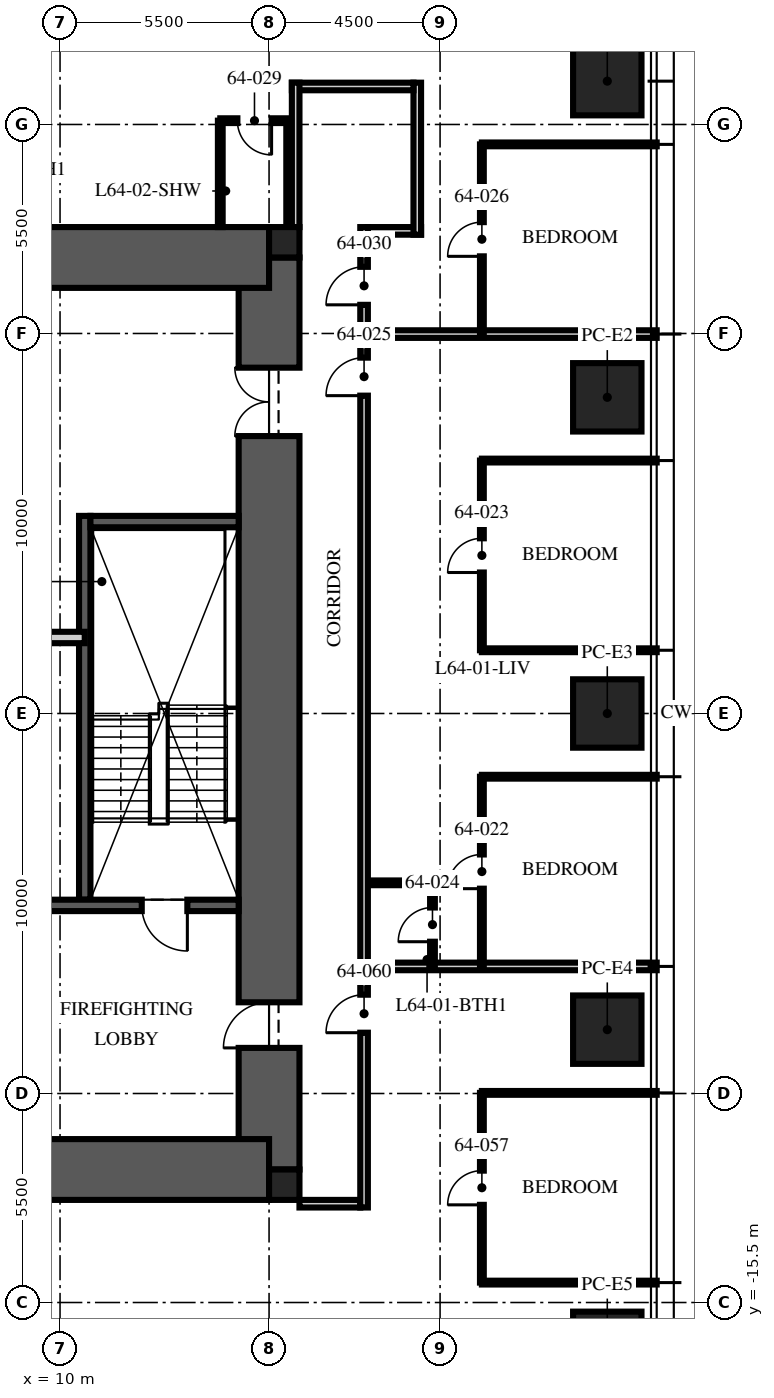
"""IFC4 building model, lengths in metres.
Left out: names, types, materials, properties, quantities, classifications, styles, units other than length and angle.
Written with IfcOpenShell. Run it as: python <this file> out.ifc"""

import sys

from ifc_helpers import new_model, si_unit, direction, frame, frame_2d, origin, origin_2d, place, context, subcontext, project, spatial, rectangle, extrude, element, fill, save


model = new_model("IFC4")
c1 = context("Model", 3, precision=1e-05, world=origin(), true_north=direction((0.0, 1.0)))
c2 = subcontext(c1, "Body", "Model", "MODEL_VIEW")
j1 = project(units=[si_unit("LENGTHUNIT", "METRE"), si_unit("PLANEANGLEUNIT", "RADIAN")], contexts=[c1])
p1 = place(None, origin())
s1 = spatial("IfcSite", under=j1, at=p1, CompositionType="ELEMENT")
p2 = place(p1, origin())
s2 = spatial("IfcBuilding", under=s1, at=p2, CompositionType="ELEMENT")
p3 = place(p2, frame((0.0, 0.0, 255.75)))
s3 = spatial("IfcBuildingStorey", under=s2, at=p3, CompositionType="ELEMENT", Elevation=255.75)
p4 = place(p3, frame((15.5, -12.0, -0.25), z_axis=(0.0, 0.0, 1.0), x_axis=(0.0, 1.0, 0.0)))
e1 = element("IfcWall", 1, at=p4, inside=s3, PredefinedType="SHEAR", context=c2, shape_type="SweptSolid", body=[
    extrude(rectangle(XDim=24.0, YDim=1.6, at=frame_2d((12.0, 0.0))), origin(), (0.0, 0.0, 1.0), 3.75),
])
p5 = place(p4, frame((3.2, 0.0, 0.25)))
e2 = element("IfcOpeningElement", 2, at=p5, cuts=e1, PredefinedType="OPENING", context=c2, shape_type="SweptSolid", body=[
    extrude(rectangle(XDim=1.2, YDim=2.1, at=frame_2d((0.6, 1.05))), frame((0.0, 0.81, 0.0), z_axis=(0.0, -1.0, 0.0), x_axis=(1.0, 0.0, 0.0)), (0.0, 0.0, 1.0), 1.62),
])
p6 = place(p4, frame((19.3, 0.0, 0.25)))
e3 = element("IfcOpeningElement", 3, at=p6, cuts=e1, PredefinedType="OPENING", context=c2, shape_type="SweptSolid", body=[
    extrude(rectangle(XDim=1.8, YDim=2.1, at=frame_2d((0.9, 1.05))), frame((0.0, 0.81, 0.0), z_axis=(0.0, -1.0, 0.0), x_axis=(1.0, 0.0, 0.0)), (0.0, 0.0, 1.0), 1.62),
])
for number, where, z_axis, x_axis in (
    (4, (-15.5, 12.0, -0.25), (0.0, 0.0, 1.0), (1.0, 0.0, 0.0)),
    (5, (-15.5, -12.0, -0.25), (0.0, 0.0, 1.0), (1.0, 0.0, 0.0)),
):
    element("IfcWall", number, at=place(p3, frame(where, z_axis=z_axis, x_axis=x_axis)), inside=s3, PredefinedType="SHEAR", context=c2, shape_type="SweptSolid", body=[
        extrude(rectangle(XDim=31.0, YDim=1.6, at=frame_2d((15.5, 0.0))), origin(), (0.0, 0.0, 1.0), 3.75),
    ])
for number, where, z_axis, x_axis in (
    (6, (15.9, 12.4, -0.25), (0.0, 0.0, 1.0), (1.0, 0.0, 0.0)),
    (7, (15.9, -12.4, -0.25), (0.0, 0.0, 1.0), (1.0, 0.0, 0.0)),
):
    element("IfcColumn", number, at=place(p3, frame(where, z_axis=z_axis, x_axis=x_axis)), inside=s3, PredefinedType="COLUMN", context=c2, shape_type="SweptSolid", body=[
        extrude(rectangle(XDim=0.8, YDim=0.8, at=origin_2d()), origin(), (0.0, 0.0, 1.0), 3.75),
    ])
for number, where, z_axis, x_axis in (
    (8, (24.4, 16.64, 0.0), (0.0, 0.0, 1.0), (0.0, 1.0, 0.0)),
    (9, (24.4, 8.32, 0.0), (0.0, 0.0, 1.0), (0.0, 1.0, 0.0)),
    (10, (24.4, 0.0, 0.0), (0.0, 0.0, 1.0), (0.0, 1.0, 0.0)),
    (11, (24.4, -8.32, 0.0), (0.0, 0.0, 1.0), (0.0, 1.0, 0.0)),
    (12, (24.4, -16.64, 0.0), (0.0, 0.0, 1.0), (0.0, 1.0, 0.0)),
):
    element("IfcColumn", number, at=place(p3, frame(where, z_axis=z_axis, x_axis=x_axis)), inside=s3, PredefinedType="COLUMN", context=c2, shape_type="SweptSolid", body=[
        extrude(rectangle(XDim=1.8, YDim=1.8, at=origin_2d()), origin(), (0.0, 0.0, 1.0), 3.75),
    ])
p7 = place(p3, frame((10.65, -4.9, 0.0), z_axis=(0.0, 0.0, 1.0), x_axis=(0.0, 1.0, 0.0)))
e13 = element("IfcWall", 13, at=p7, inside=s3, PredefinedType="SOLIDWALL", context=c2, shape_type="SweptSolid", body=[
    extrude(rectangle(XDim=10.1, YDim=0.3, at=frame_2d((5.05, 0.0))), origin(), (0.0, 0.0, 1.0), 3.5),
])
p8 = place(p3, frame((14.7, -5.05, 0.0), z_axis=(0.0, 0.0, 1.0), x_axis=(-1.0, 0.0, 0.0)))
e14 = element("IfcWall", 14, at=p8, inside=s3, PredefinedType="SOLIDWALL", context=c2, shape_type="SweptSolid", body=[
    extrude(rectangle(XDim=5.9, YDim=0.3, at=frame_2d((2.95, 0.0))), origin(), (0.0, 0.0, 1.0), 3.5),
])
p9 = place(p8, frame((1.35, 0.0, 0.0)))
e15 = element("IfcOpeningElement", 15, at=p9, cuts=e14, PredefinedType="OPENING", context=c2, shape_type="SweptSolid", body=[
    extrude(rectangle(XDim=1.2, YDim=2.1, at=frame_2d((0.6, 1.05))), frame((0.0, 0.16, 0.0), z_axis=(0.0, -1.0, 0.0), x_axis=(1.0, 0.0, 0.0)), (0.0, 0.0, 1.0), 0.32),
])
p10 = place(p3, frame((14.7, 5.05, 0.0), z_axis=(0.0, 0.0, 1.0), x_axis=(-1.0, 0.0, 0.0)))
e16 = element("IfcWall", 16, at=p10, inside=s3, PredefinedType="SOLIDWALL", context=c2, shape_type="SweptSolid", body=[
    extrude(rectangle(XDim=3.9, YDim=0.3, at=frame_2d((1.95, 0.0))), origin(), (0.0, 0.0, 1.0), 3.5),
])
p11 = place(p3, frame((-10.65, 2.0, 0.0), z_axis=(0.0, 0.0, 1.0), x_axis=(1.0, 0.0, 0.0)))
e17 = element("IfcWall", 17, at=p11, inside=s3, PredefinedType="PARTITIONING", context=c2, shape_type="SweptSolid", body=[
    extrude(rectangle(XDim=21.3, YDim=0.3, at=frame_2d((10.65, 0.0))), origin(), (0.0, 0.0, 1.0), 3.5),
])
p12 = place(p11, frame((10.05, 0.0, 0.0)))
e18 = element("IfcOpeningElement", 18, at=p12, cuts=e17, PredefinedType="OPENING", context=c2, shape_type="SweptSolid", body=[
    extrude(rectangle(XDim=1.2, YDim=2.1, at=frame_2d((0.6, 1.05))), frame((0.0, 0.16, 0.0), z_axis=(0.0, -1.0, 0.0), x_axis=(1.0, 0.0, 0.0)), (0.0, 0.0, 1.0), 0.32),
])
p13 = place(p11, frame((18.942, 0.0, 0.0)))
e19 = element("IfcOpeningElement", 19, at=p13, cuts=e17, PredefinedType="OPENING", context=c2, shape_type="SweptSolid", body=[
    extrude(rectangle(XDim=0.9, YDim=2.1, at=frame_2d((0.45, 1.05))), frame((0.0, 0.16, 0.0), z_axis=(0.0, -1.0, 0.0), x_axis=(1.0, 0.0, 0.0)), (0.0, 0.0, 1.0), 0.32),
])
p14 = place(p3, frame((18.1, 12.7, 0.0), z_axis=(0.0, 0.0, 1.0), x_axis=(1.0, 0.0, 0.0)))
e20 = element("IfcWall", 20, at=p14, inside=s3, PredefinedType="PARTITIONING", context=c2, shape_type="SweptSolid", body=[
    extrude(rectangle(XDim=1.4, YDim=0.2, at=frame_2d((0.7, 0.0))), origin(), (0.0, 0.0, 1.0), 2.81),
])
p15 = place(p3, frame((19.4, 12.6, 0.0), z_axis=(0.0, 0.0, 1.0), x_axis=(0.0, 1.0, 0.0)))
e21 = element("IfcWall", 21, at=p15, inside=s3, PredefinedType="PARTITIONING", context=c2, shape_type="SweptSolid", body=[
    extrude(rectangle(XDim=4.0, YDim=0.2, at=frame_2d((2.0, 0.0))), origin(), (0.0, 0.0, 1.0), 2.6),
])
p16 = place(p3, frame((19.3, 16.5, 0.0), z_axis=(0.0, 0.0, 1.0), x_axis=(-1.0, 0.0, 0.0)))
e22 = element("IfcWall", 22, at=p16, inside=s3, PredefinedType="PARTITIONING", context=c2, shape_type="SweptSolid", body=[
    extrude(rectangle(XDim=3.2, YDim=0.2, at=frame_2d((1.6, 0.0))), origin(), (0.0, 0.0, 1.0), 2.3),
])
p17 = place(p3, frame((16.2, 16.6, 0.0), z_axis=(0.0, 0.0, 1.0), x_axis=(0.0, -1.0, 0.0)))
e23 = element("IfcWall", 23, at=p17, inside=s3, PredefinedType="PARTITIONING", context=c2, shape_type="SweptSolid", body=[
    extrude(rectangle(XDim=3.8, YDim=0.2, at=frame_2d((1.9, 0.0))), origin(), (0.0, 0.0, 1.0), 2.3),
])
p18 = place(p3, frame((16.3, -12.9, 0.0), z_axis=(0.0, 0.0, 1.0), x_axis=(1.0, 0.0, 0.0)))
e24 = element("IfcWall", 24, at=p18, inside=s3, PredefinedType="PARTITIONING", context=c2, shape_type="SweptSolid", body=[
    extrude(rectangle(XDim=1.6, YDim=0.2, at=frame_2d((0.8, 0.0))), origin(), (0.0, 0.0, 1.0), 2.3),
])
p19 = place(p3, frame((18.1, -6.656, 0.0), z_axis=(0.0, 0.0, 1.0), x_axis=(1.0, 0.0, 0.0)))
e25 = element("IfcWall", 25, at=p19, inside=s3, PredefinedType="PARTITIONING", context=c2, shape_type="SweptSolid", body=[
    extrude(rectangle(XDim=7.6, YDim=0.2, at=frame_2d((3.8, 0.0))), origin(), (0.0, 0.0, 1.0), 2.91),
])
for number, where, z_axis, x_axis in (
    (26, (21.1, -1.664, 0.0), (0.0, 0.0, 1.0), (1.0, 0.0, 0.0)),
    (27, (21.1, 1.664, 0.0), (0.0, 0.0, 1.0), (1.0, 0.0, 0.0)),
    (28, (21.1, 6.656, 0.0), (0.0, 0.0, 1.0), (1.0, 0.0, 0.0)),
):
    element("IfcWall", number, at=place(p3, frame(where, z_axis=z_axis, x_axis=x_axis)), inside=s3, PredefinedType="PARTITIONING", context=c2, shape_type="SweptSolid", body=[
        extrude(rectangle(XDim=4.6, YDim=0.1, at=frame_2d((2.3, 0.0))), origin(), (0.0, 0.0, 1.0), 2.91),
    ])
p20 = place(p3, frame((18.1, 9.984, 0.0), z_axis=(0.0, 0.0, 1.0), x_axis=(1.0, 0.0, 0.0)))
e29 = element("IfcWall", 29, at=p20, inside=s3, PredefinedType="PARTITIONING", context=c2, shape_type="SweptSolid", body=[
    extrude(rectangle(XDim=7.6, YDim=0.2, at=frame_2d((3.8, 0.0))), origin(), (0.0, 0.0, 1.0), 2.91),
])
for number, where, z_axis, x_axis in (
    (30, (21.1, 14.976, 0.0), (0.0, 0.0, 1.0), (1.0, 0.0, 0.0)),
    (31, (21.1, -14.976, 0.0), (0.0, 0.0, 1.0), (1.0, 0.0, 0.0)),
    (32, (21.1, -9.984, 0.0), (0.0, 0.0, 1.0), (1.0, 0.0, 0.0)),
):
    element("IfcWall", number, at=place(p3, frame(where, z_axis=z_axis, x_axis=x_axis)), inside=s3, PredefinedType="PARTITIONING", context=c2, shape_type="SweptSolid", body=[
        extrude(rectangle(XDim=4.6, YDim=0.1, at=frame_2d((2.3, 0.0))), origin(), (0.0, 0.0, 1.0), 2.91),
    ])
p21 = place(p3, frame((21.1, -6.656, 0.0), z_axis=(0.0, 0.0, 1.0), x_axis=(0.0, 1.0, 0.0)))
e33 = element("IfcWall", 33, at=p21, inside=s3, PredefinedType="PARTITIONING", context=c2, shape_type="SweptSolid", body=[
    extrude(rectangle(XDim=4.992, YDim=0.1, at=frame_2d((2.496, 0.0))), origin(), (0.0, 0.0, 1.0), 2.81),
])
p22 = place(p21, frame((2.046, 0.0, 0.0)))
e34 = element("IfcOpeningElement", 34, at=p22, cuts=e33, PredefinedType="OPENING", context=c2, shape_type="SweptSolid", body=[
    extrude(rectangle(XDim=0.9, YDim=2.1, at=frame_2d((0.45, 1.05))), frame((0.0, 0.06, 0.0), z_axis=(0.0, -1.0, 0.0), x_axis=(1.0, 0.0, 0.0)), (0.0, 0.0, 1.0), 0.12),
])
p23 = place(p3, frame((21.1, 1.664, 0.0), z_axis=(0.0, 0.0, 1.0), x_axis=(0.0, 1.0, 0.0)))
e35 = element("IfcWall", 35, at=p23, inside=s3, PredefinedType="PARTITIONING", context=c2, shape_type="SweptSolid", body=[
    extrude(rectangle(XDim=4.992, YDim=0.1, at=frame_2d((2.496, 0.0))), origin(), (0.0, 0.0, 1.0), 2.81),
])
p24 = place(p23, frame((2.046, 0.0, 0.0)))
e36 = element("IfcOpeningElement", 36, at=p24, cuts=e35, PredefinedType="OPENING", context=c2, shape_type="SweptSolid", body=[
    extrude(rectangle(XDim=0.9, YDim=2.1, at=frame_2d((0.45, 1.05))), frame((0.0, 0.06, 0.0), z_axis=(0.0, -1.0, 0.0), x_axis=(1.0, 0.0, 0.0)), (0.0, 0.0, 1.0), 0.12),
])
p25 = place(p3, frame((19.8, -6.656, 0.0), z_axis=(0.0, 0.0, 1.0), x_axis=(0.0, 1.0, 0.0)))
e37 = element("IfcWall", 37, at=p25, inside=s3, PredefinedType="PARTITIONING", context=c2, shape_type="SweptSolid", body=[
    extrude(rectangle(XDim=2.2, YDim=0.125, at=frame_2d((1.1, 0.0))), origin(), (0.0, 0.0, 1.0), 3.5),
])
p26 = place(p25, frame((0.65, 0.0, 0.0)))
e38 = element("IfcOpeningElement", 38, at=p26, cuts=e37, PredefinedType="OPENING", context=c2, shape_type="SweptSolid", body=[
    extrude(rectangle(XDim=0.9, YDim=2.1, at=frame_2d((0.45, 1.05))), frame((0.0, 0.073, 0.0), z_axis=(0.0, -1.0, 0.0), x_axis=(1.0, 0.0, 0.0)), (0.0, 0.0, 1.0), 0.145),
])
p27 = place(p3, frame((18.1, -4.456, 0.0), z_axis=(0.0, 0.0, 1.0), x_axis=(1.0, 0.0, 0.0)))
e39 = element("IfcWall", 39, at=p27, inside=s3, PredefinedType="PARTITIONING", context=c2, shape_type="SweptSolid", body=[
    extrude(rectangle(XDim=1.7, YDim=0.125, at=frame_2d((0.85, 0.0))), origin(), (0.0, 0.0, 1.0), 3.5),
])
p28 = place(p3, frame((21.1, 9.984, 0.0), z_axis=(0.0, 0.0, 1.0), x_axis=(0.0, 1.0, 0.0)))
e40 = element("IfcWall", 40, at=p28, inside=s3, PredefinedType="PARTITIONING", context=c2, shape_type="SweptSolid", body=[
    extrude(rectangle(XDim=4.992, YDim=0.1, at=frame_2d((2.496, 0.0))), origin(), (0.0, 0.0, 1.0), 2.81),
])
p29 = place(p28, frame((2.046, 0.0, 0.0)))
e41 = element("IfcOpeningElement", 41, at=p29, cuts=e40, PredefinedType="OPENING", context=c2, shape_type="SweptSolid", body=[
    extrude(rectangle(XDim=0.9, YDim=2.1, at=frame_2d((0.45, 1.05))), frame((0.0, 0.06, 0.0), z_axis=(0.0, -1.0, 0.0), x_axis=(1.0, 0.0, 0.0)), (0.0, 0.0, 1.0), 0.12),
])
p30 = place(p3, frame((16.017, 15.6, 0.0), z_axis=(0.0, 0.0, 1.0), x_axis=(-1.0, 0.0, 0.0)))
e42 = element("IfcWall", 42, at=p30, inside=s3, PredefinedType="PARTITIONING", context=c2, shape_type="SweptSolid", body=[
    extrude(rectangle(XDim=1.8, YDim=0.125, at=frame_2d((0.9, 0.0))), origin(), (0.0, 0.0, 1.0), 3.5),
])
p31 = place(p30, frame((0.45, 0.0, 0.0)))
e43 = element("IfcOpeningElement", 43, at=p31, cuts=e42, PredefinedType="OPENING", context=c2, shape_type="SweptSolid", body=[
    extrude(rectangle(XDim=0.9, YDim=2.1, at=frame_2d((0.45, 1.05))), frame((0.0, 0.073, 0.0), z_axis=(0.0, -1.0, 0.0), x_axis=(1.0, 0.0, 0.0)), (0.0, 0.0, 1.0), 0.145),
])
p32 = place(p3, frame((16.017, 12.8, 0.0), z_axis=(0.0, 0.0, 1.0), x_axis=(0.0, 1.0, 0.0)))
e44 = element("IfcWall", 44, at=p32, inside=s3, PredefinedType="PARTITIONING", context=c2, shape_type="SweptSolid", body=[
    extrude(rectangle(XDim=2.8, YDim=0.125, at=frame_2d((1.4, 0.0))), origin(), (0.0, 0.0, 1.0), 2.3),
])
p33 = place(p3, frame((14.217, 12.8, 0.0), z_axis=(0.0, 0.0, 1.0), x_axis=(0.0, 1.0, 0.0)))
e45 = element("IfcWall", 45, at=p33, inside=s3, PredefinedType="PARTITIONING", context=c2, shape_type="SweptSolid", body=[
    extrude(rectangle(XDim=2.8, YDim=0.125, at=frame_2d((1.4, 0.0))), origin(), (0.0, 0.0, 1.0), 3.5),
])
p34 = place(p3, frame((21.1, -14.976, 0.0), z_axis=(0.0, 0.0, 1.0), x_axis=(0.0, 1.0, 0.0)))
e46 = element("IfcWall", 46, at=p34, inside=s3, PredefinedType="PARTITIONING", context=c2, shape_type="SweptSolid", body=[
    extrude(rectangle(XDim=4.992, YDim=0.1, at=frame_2d((2.496, 0.0))), origin(), (0.0, 0.0, 1.0), 2.81),
])
p35 = place(p34, frame((2.046, 0.0, 0.0)))
e47 = element("IfcOpeningElement", 47, at=p35, cuts=e46, PredefinedType="OPENING", context=c2, shape_type="SweptSolid", body=[
    extrude(rectangle(XDim=0.9, YDim=2.1, at=frame_2d((0.45, 1.05))), frame((0.0, 0.06, 0.0), z_axis=(0.0, -1.0, 0.0), x_axis=(1.0, 0.0, 0.0)), (0.0, 0.0, 1.0), 0.12),
])
p36 = place(p3, frame((18.0, -13.0, 0.0), z_axis=(0.0, 0.0, 1.0), x_axis=(0.0, 1.0, 0.0)))
e48 = element("IfcWall", 48, at=p36, inside=s3, PredefinedType="PARTITIONING", context=c2, shape_type="SweptSolid", body=[
    extrude(rectangle(XDim=25.8, YDim=0.2, at=frame_2d((12.9, 0.0))), origin(), (0.0, 0.0, 1.0), 2.6),
])
p37 = place(p36, frame((21.364, 0.0, 0.0)))
e49 = element("IfcOpeningElement", 49, at=p37, cuts=e48, PredefinedType="OPENING", context=c2, shape_type="SweptSolid", body=[
    extrude(rectangle(XDim=1.0, YDim=2.2, at=frame_2d((0.5, 1.1))), frame((0.0, 0.11, 0.0), z_axis=(0.0, -1.0, 0.0), x_axis=(1.0, 0.0, 0.0)), (0.0, 0.0, 1.0), 0.22),
])
p38 = place(p36, frame((23.754, 0.0, 0.0)))
e50 = element("IfcOpeningElement", 50, at=p38, cuts=e48, PredefinedType="OPENING", context=c2, shape_type="SweptSolid", body=[
    extrude(rectangle(XDim=1.0, YDim=2.2, at=frame_2d((0.5, 1.1))), frame((0.0, 0.11, 0.0), z_axis=(0.0, -1.0, 0.0), x_axis=(1.0, 0.0, 0.0)), (0.0, 0.0, 1.0), 0.22),
])
p39 = place(p36, frame((4.6, 0.0, 0.0)))
e51 = element("IfcOpeningElement", 51, at=p39, cuts=e48, PredefinedType="OPENING", context=c2, shape_type="SweptSolid", body=[
    extrude(rectangle(XDim=1.0, YDim=2.2, at=frame_2d((0.5, 1.1))), frame((0.0, 0.11, 0.0), z_axis=(0.0, -1.0, 0.0), x_axis=(1.0, 0.0, 0.0)), (0.0, 0.0, 1.0), 0.22),
])
p40 = place(p9, origin())
e52 = element("IfcDoor", 52, at=p40, inside=s3, OperationType="SINGLE_SWING_LEFT", PredefinedType="DOOR", context=c2, shape_type="SweptSolid", body=[
    extrude(rectangle(XDim=1.2, YDim=2.1, at=frame_2d((0.6, 1.05))), frame((0.0, 0.025, 0.0), z_axis=(0.0, -1.0, 0.0), x_axis=(1.0, 0.0, 0.0)), (0.0, 0.0, 1.0), 0.05),
])
fill(e15, e52)
p41 = place(p5, origin())
e53 = element("IfcDoor", 53, at=p41, inside=s3, OperationType="SINGLE_SWING_LEFT", PredefinedType="DOOR", context=c2, shape_type="SweptSolid", body=[
    extrude(rectangle(XDim=1.2, YDim=2.1, at=frame_2d((0.6, 1.05))), frame((0.0, 0.025, 0.0), z_axis=(0.0, -1.0, 0.0), x_axis=(1.0, 0.0, 0.0)), (0.0, 0.0, 1.0), 0.05),
])
fill(e2, e53)
p42 = place(p6, origin())
e54 = element("IfcDoor", 54, at=p42, inside=s3, OperationType="DOUBLE_DOOR_SINGLE_SWING", PredefinedType="DOOR", context=c2, shape_type="SweptSolid", body=[
    extrude(rectangle(XDim=1.8, YDim=2.1, at=frame_2d((0.9, 1.05))), frame((0.0, 0.025, 0.0), z_axis=(0.0, -1.0, 0.0), x_axis=(1.0, 0.0, 0.0)), (0.0, 0.0, 1.0), 0.05),
])
fill(e3, e54)
p43 = place(p22, origin())
e55 = element("IfcDoor", 55, at=p43, inside=s3, OperationType="SINGLE_SWING_LEFT", PredefinedType="DOOR", context=c2, shape_type="SweptSolid", body=[
    extrude(rectangle(XDim=0.9, YDim=2.1, at=frame_2d((0.45, 1.05))), frame((0.0, 0.025, 0.0), z_axis=(0.0, -1.0, 0.0), x_axis=(1.0, 0.0, 0.0)), (0.0, 0.0, 1.0), 0.05),
])
fill(e34, e55)
p44 = place(p24, origin())
e56 = element("IfcDoor", 56, at=p44, inside=s3, OperationType="SINGLE_SWING_LEFT", PredefinedType="DOOR", context=c2, shape_type="SweptSolid", body=[
    extrude(rectangle(XDim=0.9, YDim=2.1, at=frame_2d((0.45, 1.05))), frame((0.0, 0.025, 0.0), z_axis=(0.0, -1.0, 0.0), x_axis=(1.0, 0.0, 0.0)), (0.0, 0.0, 1.0), 0.05),
])
fill(e36, e56)
p45 = place(p26, origin())
e57 = element("IfcDoor", 57, at=p45, inside=s3, OperationType="SINGLE_SWING_LEFT", PredefinedType="DOOR", context=c2, shape_type="SweptSolid", body=[
    extrude(rectangle(XDim=0.9, YDim=2.1, at=frame_2d((0.45, 1.05))), frame((0.0, 0.025, 0.0), z_axis=(0.0, -1.0, 0.0), x_axis=(1.0, 0.0, 0.0)), (0.0, 0.0, 1.0), 0.05),
])
fill(e38, e57)
p46 = place(p37, origin())
e58 = element("IfcDoor", 58, at=p46, inside=s3, OperationType="SINGLE_SWING_LEFT", PredefinedType="DOOR", context=c2, shape_type="SweptSolid", body=[
    extrude(rectangle(XDim=1.0, YDim=2.2, at=frame_2d((0.5, 1.1))), frame((0.0, 0.025, 0.0), z_axis=(0.0, -1.0, 0.0), x_axis=(1.0, 0.0, 0.0)), (0.0, 0.0, 1.0), 0.05),
])
fill(e49, e58)
p47 = place(p29, origin())
e59 = element("IfcDoor", 59, at=p47, inside=s3, OperationType="SINGLE_SWING_LEFT", PredefinedType="DOOR", context=c2, shape_type="SweptSolid", body=[
    extrude(rectangle(XDim=0.9, YDim=2.1, at=frame_2d((0.45, 1.05))), frame((0.0, 0.025, 0.0), z_axis=(0.0, -1.0, 0.0), x_axis=(1.0, 0.0, 0.0)), (0.0, 0.0, 1.0), 0.05),
])
fill(e41, e59)
p48 = place(p31, origin())
e60 = element("IfcDoor", 60, at=p48, inside=s3, OperationType="SINGLE_SWING_LEFT", PredefinedType="DOOR", context=c2, shape_type="SweptSolid", body=[
    extrude(rectangle(XDim=0.9, YDim=2.1, at=frame_2d((0.45, 1.05))), frame((0.0, 0.025, 0.0), z_axis=(0.0, -1.0, 0.0), x_axis=(1.0, 0.0, 0.0)), (0.0, 0.0, 1.0), 0.05),
])
fill(e43, e60)
p49 = place(p38, origin())
e61 = element("IfcDoor", 61, at=p49, inside=s3, OperationType="SINGLE_SWING_LEFT", PredefinedType="DOOR", context=c2, shape_type="SweptSolid", body=[
    extrude(rectangle(XDim=1.0, YDim=2.2, at=frame_2d((0.5, 1.1))), frame((0.0, 0.025, 0.0), z_axis=(0.0, -1.0, 0.0), x_axis=(1.0, 0.0, 0.0)), (0.0, 0.0, 1.0), 0.05),
])
fill(e50, e61)
p50 = place(p35, origin())
e62 = element("IfcDoor", 62, at=p50, inside=s3, OperationType="SINGLE_SWING_LEFT", PredefinedType="DOOR", context=c2, shape_type="SweptSolid", body=[
    extrude(rectangle(XDim=0.9, YDim=2.1, at=frame_2d((0.45, 1.05))), frame((0.0, 0.025, 0.0), z_axis=(0.0, -1.0, 0.0), x_axis=(1.0, 0.0, 0.0)), (0.0, 0.0, 1.0), 0.05),
])
fill(e47, e62)
p51 = place(p39, origin())
e63 = element("IfcDoor", 63, at=p51, inside=s3, OperationType="SINGLE_SWING_LEFT", PredefinedType="DOOR", context=c2, shape_type="SweptSolid", body=[
    extrude(rectangle(XDim=1.0, YDim=2.2, at=frame_2d((0.5, 1.1))), frame((0.0, 0.025, 0.0), z_axis=(0.0, -1.0, 0.0), x_axis=(1.0, 0.0, 0.0)), (0.0, 0.0, 1.0), 0.05),
])
fill(e51, e63)
save(model, sys.argv[1])
